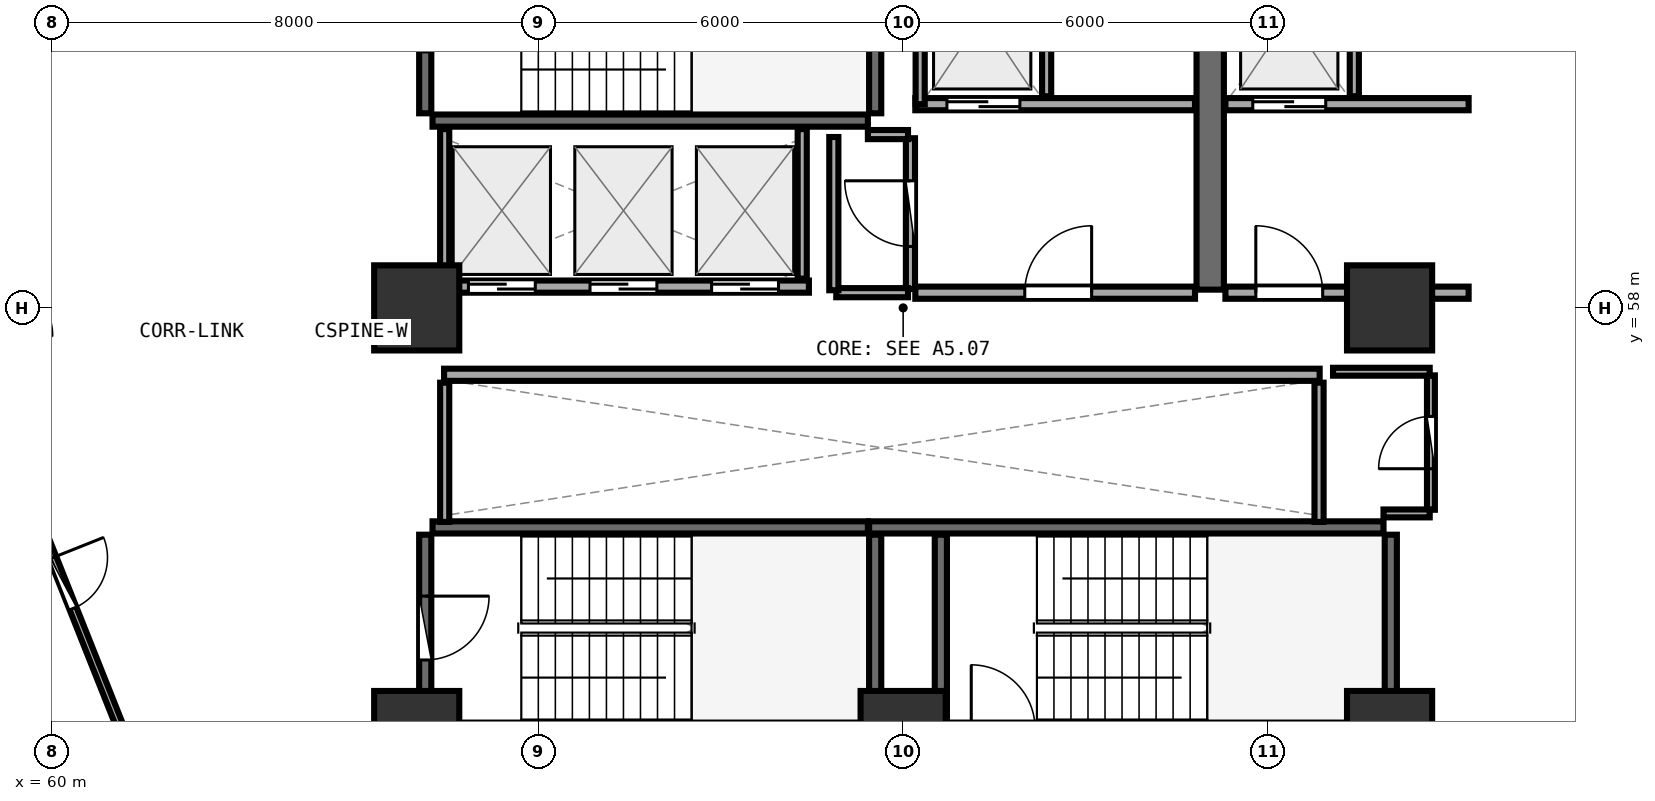
"""IFC4 building model, lengths in metres.
Left out: names, types, materials, properties, quantities, classifications, styles, units other than length and angle.
Written with IfcOpenShell. Run it as: python <this file> out.ifc"""

import sys

from ifc_helpers import new_model, si_unit, direction, frame, frame_2d, origin, origin_2d, place, context, subcontext, project, spatial, rectangle, extrude, element, fill, save


model = new_model("IFC4")
c1 = context("Model", 3, precision=1e-05, world=origin(), true_north=direction((0.0, 1.0)))
c2 = subcontext(c1, "Body", "Model", "MODEL_VIEW")
j1 = project(units=[si_unit("LENGTHUNIT", "METRE"), si_unit("PLANEANGLEUNIT", "RADIAN")], contexts=[c1])
p1 = place(None, origin())
s1 = spatial("IfcSite", under=j1, at=p1, CompositionType="ELEMENT")
p2 = place(p1, origin())
s2 = spatial("IfcBuilding", under=s1, at=p2, CompositionType="ELEMENT")
p3 = place(p2, frame((0.0, 0.0, 48.75)))
s3 = spatial("IfcBuildingStorey", under=s2, at=p3, CompositionType="ELEMENT", Elevation=48.75)
for number, where, z_axis, x_axis in (
    (1, (66.0, 51.0, 0.0), (0.0, 0.0, 1.0), (1.0, 0.0, 0.0)),
    (2, (74.0, 51.0, 0.0), (0.0, 0.0, 1.0), (1.0, 0.0, 0.0)),
    (3, (82.0, 51.0, 0.0), (0.0, 0.0, 1.0), (1.0, 0.0, 0.0)),
    (4, (82.0, 58.0, 0.0), (0.0, 0.0, 1.0), (1.0, 0.0, 0.0)),
    (5, (66.0, 58.0, 0.0), (0.0, 0.0, 1.0), (1.0, 0.0, 0.0)),
):
    element("IfcColumn", number, at=place(p3, frame(where, z_axis=z_axis, x_axis=x_axis)), inside=s3, PredefinedType="PILASTER", context=c2, shape_type="SweptSolid", body=[
        extrude(rectangle(XDim=1.4, YDim=1.4, at=origin_2d()), origin(), (0.0, 0.0, 1.0), 3.75),
    ])
p4 = place(p3, frame((66.26, 61.08, 0.0), z_axis=(0.0, 0.0, 1.0), x_axis=(1.0, 0.0, 0.0)))
e6 = element("IfcWall", 6, at=p4, inside=s3, PredefinedType="SHEAR", context=c2, shape_type="SweptSolid", body=[
    extrude(rectangle(XDim=7.16, YDim=0.2, at=frame_2d((3.58, 0.0))), origin(), (0.0, 0.0, 1.0), 3.49),
])
p5 = place(p3, frame((73.54, 61.2, 0.0), z_axis=(0.0, 0.0, 1.0), x_axis=(0.0, 1.0, 0.0)))
e7 = element("IfcWall", 7, at=p5, inside=s3, PredefinedType="SHEAR", context=c2, shape_type="SweptSolid", body=[
    extrude(rectangle(XDim=3.07, YDim=0.2, at=frame_2d((1.535, 0.0))), origin(), (0.0, 0.0, 1.0), 3.49),
])
p6 = place(p3, frame((66.14, 64.27, 0.0), z_axis=(0.0, 0.0, 1.0), x_axis=(0.0, -1.0, 0.0)))
e8 = element("IfcWall", 8, at=p6, inside=s3, PredefinedType="SHEAR", context=c2, shape_type="SweptSolid", body=[
    extrude(rectangle(XDim=3.07, YDim=0.2, at=frame_2d((1.535, 0.0))), origin(), (0.0, 0.0, 1.0), 3.49),
])
p7 = place(p6, frame((1.01, 0.0, 0.0)))
e9 = element("IfcOpeningElement", 9, at=p7, cuts=e8, PredefinedType="OPENING", context=c2, shape_type="SweptSolid", body=[
    extrude(rectangle(XDim=1.05, YDim=2.1, at=frame_2d((0.525, 1.05))), frame((0.0, 0.11, 0.0), z_axis=(0.0, -1.0, 0.0), x_axis=(1.0, 0.0, 0.0)), (0.0, 0.0, 1.0), 0.22),
])
p8 = place(p3, frame((82.02, 51.2, 0.0), z_axis=(0.0, 0.0, 1.0), x_axis=(0.0, 1.0, 0.0)))
e10 = element("IfcWall", 10, at=p8, inside=s3, PredefinedType="SHEAR", context=c2, shape_type="SweptSolid", body=[
    extrude(rectangle(XDim=3.07, YDim=0.2, at=frame_2d((1.535, 0.0))), origin(), (0.0, 0.0, 1.0), 3.49),
])
p9 = place(p3, frame((81.9, 54.39, 0.0), z_axis=(0.0, 0.0, 1.0), x_axis=(-1.0, 0.0, 0.0)))
e11 = element("IfcWall", 11, at=p9, inside=s3, PredefinedType="SHEAR", context=c2, shape_type="SweptSolid", body=[
    extrude(rectangle(XDim=8.46, YDim=0.2, at=frame_2d((4.23, 0.0))), origin(), (0.0, 0.0, 1.0), 3.49),
])
for number, where, z_axis, x_axis in (
    (12, (74.62, 54.27, 0.0), (0.0, 0.0, 1.0), (0.0, -1.0, 0.0)),
    (13, (73.54, 51.2, 0.0), (0.0, 0.0, 1.0), (0.0, 1.0, 0.0)),
):
    element("IfcWall", number, at=place(p3, frame(where, z_axis=z_axis, x_axis=x_axis)), inside=s3, PredefinedType="SHEAR", context=c2, shape_type="SweptSolid", body=[
        extrude(rectangle(XDim=3.07, YDim=0.2, at=frame_2d((1.535, 0.0))), origin(), (0.0, 0.0, 1.0), 3.49),
    ])
p10 = place(p3, frame((73.42, 54.39, 0.0), z_axis=(0.0, 0.0, 1.0), x_axis=(-1.0, 0.0, 0.0)))
e14 = element("IfcWall", 14, at=p10, inside=s3, PredefinedType="SHEAR", context=c2, shape_type="SweptSolid", body=[
    extrude(rectangle(XDim=7.16, YDim=0.2, at=frame_2d((3.58, 0.0))), origin(), (0.0, 0.0, 1.0), 3.49),
])
p11 = place(p3, frame((66.14, 54.27, 0.0), z_axis=(0.0, 0.0, 1.0), x_axis=(0.0, -1.0, 0.0)))
e15 = element("IfcWall", 15, at=p11, inside=s3, PredefinedType="SHEAR", context=c2, shape_type="SweptSolid", body=[
    extrude(rectangle(XDim=3.07, YDim=0.2, at=frame_2d((1.535, 0.0))), origin(), (0.0, 0.0, 1.0), 3.49),
])
p12 = place(p11, frame((1.01, 0.0, 0.0)))
e16 = element("IfcOpeningElement", 16, at=p12, cuts=e15, PredefinedType="OPENING", context=c2, shape_type="SweptSolid", body=[
    extrude(rectangle(XDim=1.05, YDim=2.1, at=frame_2d((0.525, 1.05))), frame((0.0, 0.11, 0.0), z_axis=(0.0, -1.0, 0.0), x_axis=(1.0, 0.0, 0.0)), (0.0, 0.0, 1.0), 0.22),
])
p13 = place(p3, frame((79.05, 58.3, 0.0), z_axis=(0.0, 0.0, 1.0), x_axis=(0.0, 1.0, 0.0)))
e17 = element("IfcWall", 17, at=p13, inside=s3, PredefinedType="SHEAR", context=c2, shape_type="SweptSolid", body=[
    extrude(rectangle(XDim=6.3, YDim=0.45, at=frame_2d((3.15, 0.0))), origin(), (0.0, 0.0, 1.0), 3.49),
])
p14 = place(p3, frame((74.2, 61.35, 0.0), z_axis=(0.0, 0.0, 1.0), x_axis=(1.0, 0.0, 0.0)))
e18 = element("IfcWall", 18, at=p14, inside=s3, PredefinedType="SOLIDWALL", context=c2, shape_type="SweptSolid", body=[
    extrude(rectangle(XDim=4.6, YDim=0.2, at=frame_2d((2.3, 0.0))), origin(), (0.0, 0.0, 1.0), 3.48),
])
p15 = place(p14, frame((0.52, 0.0, 0.0)))
e19 = element("IfcOpeningElement", 19, at=p15, cuts=e18, PredefinedType="OPENING", context=c2, shape_type="SweptSolid", body=[
    extrude(rectangle(XDim=1.2, YDim=2.15, at=frame_2d((0.6, 1.075))), frame((0.0, 0.11, 0.0), z_axis=(0.0, -1.0, 0.0), x_axis=(1.0, 0.0, 0.0)), (0.0, 0.0, 1.0), 0.22),
])
p16 = place(p3, frame((74.28, 61.35, 0.0), z_axis=(0.0, 0.0, 1.0), x_axis=(0.0, 1.0, 0.0)))
e20 = element("IfcWall", 20, at=p16, inside=s3, PredefinedType="PARTITIONING", context=c2, shape_type="SweptSolid", body=[
    extrude(rectangle(XDim=2.97, YDim=0.15, at=frame_2d((1.485, 0.0))), origin(), (0.0, 0.0, 1.0), 3.48),
])
p17 = place(p3, frame((76.36, 61.48, 0.0), z_axis=(0.0, 0.0, 1.0), x_axis=(0.0, 1.0, 0.0)))
e21 = element("IfcWall", 21, at=p17, inside=s3, PredefinedType="PARTITIONING", context=c2, shape_type="SweptSolid", body=[
    extrude(rectangle(XDim=2.84, YDim=0.15, at=frame_2d((1.42, 0.0))), origin(), (0.0, 0.0, 1.0), 3.48),
])
p18 = place(p3, frame((79.3, 61.35, 0.0), z_axis=(0.0, 0.0, 1.0), x_axis=(1.0, 0.0, 0.0)))
e22 = element("IfcWall", 22, at=p18, inside=s3, PredefinedType="SOLIDWALL", context=c2, shape_type="SweptSolid", body=[
    extrude(rectangle(XDim=4.0, YDim=0.2, at=frame_2d((2.0, 0.0))), origin(), (0.0, 0.0, 1.0), 2.775),
])
p19 = place(p18, frame((0.45, 0.0, 0.0)))
e23 = element("IfcOpeningElement", 23, at=p19, cuts=e22, PredefinedType="OPENING", context=c2, shape_type="SweptSolid", body=[
    extrude(rectangle(XDim=1.2, YDim=2.15, at=frame_2d((0.6, 1.075))), frame((0.0, 0.11, 0.0), z_axis=(0.0, -1.0, 0.0), x_axis=(1.0, 0.0, 0.0)), (0.0, 0.0, 1.0), 0.22),
])
p20 = place(p3, frame((81.42, 61.48, 0.0), z_axis=(0.0, 0.0, 1.0), x_axis=(0.0, 1.0, 0.0)))
e24 = element("IfcWall", 24, at=p20, inside=s3, PredefinedType="PARTITIONING", context=c2, shape_type="SweptSolid", body=[
    extrude(rectangle(XDim=2.84, YDim=0.15, at=frame_2d((1.42, 0.0))), origin(), (0.0, 0.0, 1.0), 3.48),
])
p21 = place(p3, frame((74.2, 58.25, 0.0), z_axis=(0.0, 0.0, 1.0), x_axis=(1.0, 0.0, 0.0)))
e25 = element("IfcWall", 25, at=p21, inside=s3, PredefinedType="SOLIDWALL", context=c2, shape_type="SweptSolid", body=[
    extrude(rectangle(XDim=4.6, YDim=0.2, at=frame_2d((2.3, 0.0))), origin(), (0.0, 0.0, 1.0), 3.48),
])
p22 = place(p21, frame((1.8, 0.0, 0.0)))
e26 = element("IfcOpeningElement", 26, at=p22, cuts=e25, PredefinedType="OPENING", context=c2, shape_type="SweptSolid", body=[
    extrude(rectangle(XDim=1.1, YDim=2.1, at=frame_2d((0.55, 1.05))), frame((0.0, 0.11, 0.0), z_axis=(0.0, -1.0, 0.0), x_axis=(1.0, 0.0, 0.0)), (0.0, 0.0, 1.0), 0.22),
])
p23 = place(p3, frame((79.3, 58.25, 0.0), z_axis=(0.0, 0.0, 1.0), x_axis=(1.0, 0.0, 0.0)))
e27 = element("IfcWall", 27, at=p23, inside=s3, PredefinedType="SOLIDWALL", context=c2, shape_type="SweptSolid", body=[
    extrude(rectangle(XDim=4.0, YDim=0.2, at=frame_2d((2.0, 0.0))), origin(), (0.0, 0.0, 1.0), 2.775),
])
p24 = place(p23, frame((0.5, 0.0, 0.0)))
e28 = element("IfcOpeningElement", 28, at=p24, cuts=e27, PredefinedType="OPENING", context=c2, shape_type="SweptSolid", body=[
    extrude(rectangle(XDim=1.1, YDim=2.1, at=frame_2d((0.55, 1.05))), frame((0.0, 0.11, 0.0), z_axis=(0.0, -1.0, 0.0), x_axis=(1.0, 0.0, 0.0)), (0.0, 0.0, 1.0), 0.22),
])
p25 = place(p3, frame((66.45, 58.35, 0.0), z_axis=(0.0, 0.0, 1.0), x_axis=(1.0, 0.0, 0.0)))
e29 = element("IfcWall", 29, at=p25, inside=s3, PredefinedType="SOLIDWALL", context=c2, shape_type="SweptSolid", body=[
    extrude(rectangle(XDim=6.0, YDim=0.2, at=frame_2d((3.0, 0.0))), origin(), (0.0, 0.0, 1.0), 3.48),
])
p26 = place(p25, frame((0.4, 0.0, 0.0)))
e30 = element("IfcOpeningElement", 30, at=p26, cuts=e29, PredefinedType="OPENING", context=c2, shape_type="SweptSolid", body=[
    extrude(rectangle(XDim=1.1, YDim=2.1, at=frame_2d((0.55, 1.05))), frame((0.0, 0.11, 0.0), z_axis=(0.0, -1.0, 0.0), x_axis=(1.0, 0.0, 0.0)), (0.0, 0.0, 1.0), 0.22),
])
p27 = place(p25, frame((2.4, 0.0, 0.0)))
e31 = element("IfcOpeningElement", 31, at=p27, cuts=e29, PredefinedType="OPENING", context=c2, shape_type="SweptSolid", body=[
    extrude(rectangle(XDim=1.1, YDim=2.1, at=frame_2d((0.55, 1.05))), frame((0.0, 0.11, 0.0), z_axis=(0.0, -1.0, 0.0), x_axis=(1.0, 0.0, 0.0)), (0.0, 0.0, 1.0), 0.22),
])
p28 = place(p25, frame((4.4, 0.0, 0.0)))
e32 = element("IfcOpeningElement", 32, at=p28, cuts=e29, PredefinedType="OPENING", context=c2, shape_type="SweptSolid", body=[
    extrude(rectangle(XDim=1.1, YDim=2.1, at=frame_2d((0.55, 1.05))), frame((0.0, 0.11, 0.0), z_axis=(0.0, -1.0, 0.0), x_axis=(1.0, 0.0, 0.0)), (0.0, 0.0, 1.0), 0.22),
])
for number, where, z_axis, x_axis in (
    (33, (66.46, 58.48, 0.0), (0.0, 0.0, 1.0), (0.0, 1.0, 0.0)),
    (34, (72.34, 58.48, 0.0), (0.0, 0.0, 1.0), (0.0, 1.0, 0.0)),
):
    element("IfcWall", number, at=place(p3, frame(where, z_axis=z_axis, x_axis=x_axis)), inside=s3, PredefinedType="PARTITIONING", context=c2, shape_type="SweptSolid", body=[
        extrude(rectangle(XDim=2.46, YDim=0.15, at=frame_2d((1.23, 0.0))), origin(), (0.0, 0.0, 1.0), 3.48),
    ])
p29 = place(p3, frame((66.45, 56.9, 0.0), z_axis=(0.0, 0.0, 1.0), x_axis=(1.0, 0.0, 0.0)))
e35 = element("IfcWall", 35, at=p29, inside=s3, PredefinedType="SOLIDWALL", context=c2, shape_type="SweptSolid", body=[
    extrude(rectangle(XDim=14.4, YDim=0.2, at=frame_2d((7.2, 0.0))), origin(), (0.0, 0.0, 1.0), 3.48),
])
for number, where, z_axis, x_axis in (
    (36, (66.46, 54.48, 0.0), (0.0, 0.0, 1.0), (0.0, 1.0, 0.0)),
    (37, (80.84, 54.48, 0.0), (0.0, 0.0, 1.0), (0.0, 1.0, 0.0)),
):
    element("IfcWall", number, at=place(p3, frame(where, z_axis=z_axis, x_axis=x_axis)), inside=s3, PredefinedType="PARTITIONING", context=c2, shape_type="SweptSolid", body=[
        extrude(rectangle(XDim=2.29, YDim=0.15, at=frame_2d((1.145, 0.0))), origin(), (0.0, 0.0, 1.0), 3.48),
    ])
p30 = place(p3, frame((74.12, 58.31, 0.0), z_axis=(0.0, 0.0, 1.0), x_axis=(0.0, 1.0, 0.0)))
e38 = element("IfcWall", 38, at=p30, inside=s3, PredefinedType="PARTITIONING", context=c2, shape_type="SweptSolid", body=[
    extrude(rectangle(XDim=2.48, YDim=0.15, at=frame_2d((1.24, 0.0))), origin(), (0.0, 0.0, 1.0), 3.48),
])
p31 = place(p30, frame((0.7, 0.0, 0.0)))
e39 = element("IfcOpeningElement", 39, at=p31, cuts=e38, PredefinedType="OPENING", context=c2, shape_type="SweptSolid", body=[
    extrude(rectangle(XDim=1.08, YDim=2.1, at=frame_2d((0.54, 1.05))), frame((0.0, 0.085, 0.0), z_axis=(0.0, -1.0, 0.0), x_axis=(1.0, 0.0, 0.0)), (0.0, 0.0, 1.0), 0.17),
])
p32 = place(p3, frame((82.68, 54.68, 0.0), z_axis=(0.0, 0.0, 1.0), x_axis=(0.0, 1.0, 0.0)))
e40 = element("IfcWall", 40, at=p32, inside=s3, PredefinedType="PLUMBINGWALL", context=c2, shape_type="SweptSolid", body=[
    extrude(rectangle(XDim=2.21, YDim=0.13, at=frame_2d((1.105, 0.0))), origin(), (0.0, 0.0, 1.0), 3.48),
])
p33 = place(p32, frame((0.675, 0.0, 0.0)))
e41 = element("IfcOpeningElement", 41, at=p33, cuts=e40, PredefinedType="OPENING", context=c2, shape_type="SweptSolid", body=[
    extrude(rectangle(XDim=0.86, YDim=2.05, at=frame_2d((0.43, 1.025))), frame((0.0, 0.075, 0.0), z_axis=(0.0, -1.0, 0.0), x_axis=(1.0, 0.0, 0.0)), (0.0, 0.0, 1.0), 0.15),
])
p34 = place(p3, frame((59.128, 56.118, 0.0), z_axis=(0.0, 0.0, 1.0), x_axis=(0.369903929858, -0.929070009566, 0.0)))
e42 = element("IfcWall", 42, at=p34, inside=s3, PredefinedType="PARTITIONING", context=c2, shape_type="SweptSolid", body=[
    extrude(rectangle(XDim=5.693, YDim=0.12, at=frame_2d((2.846, 0.0))), origin(), (0.0, 0.0, 1.0), 2.875),
])
p35 = place(p34, frame((2.396, 0.0, 0.0)))
e43 = element("IfcOpeningElement", 43, at=p35, cuts=e42, PredefinedType="OPENING", context=c2, shape_type="SweptSolid", body=[
    extrude(rectangle(XDim=0.9, YDim=2.08, at=frame_2d((0.45, 1.04))), frame((0.0, 0.07, 0.0), z_axis=(0.0, -1.0, 0.0), x_axis=(1.0, 0.0, 0.0)), (0.0, 0.0, 1.0), 0.14),
])
p36 = place(p3, frame((84.895, 48.628, 0.0), z_axis=(0.0, 0.0, 1.0), x_axis=(0.560933949984, 0.827860558159, 0.0)))
e44 = element("IfcWall", 44, at=p36, inside=s3, PredefinedType="PARTITIONING", context=c2, shape_type="SweptSolid", body=[
    extrude(rectangle(XDim=5.788, YDim=0.12, at=frame_2d((2.894, 0.0))), origin(), (0.0, 0.0, 1.0), 2.875),
])
p37 = place(p36, frame((2.444, 0.0, 0.0)))
e45 = element("IfcOpeningElement", 45, at=p37, cuts=e44, PredefinedType="OPENING", context=c2, shape_type="SweptSolid", body=[
    extrude(rectangle(XDim=0.9, YDim=2.08, at=frame_2d((0.45, 1.04))), frame((0.0, 0.07, 0.0), z_axis=(0.0, -1.0, 0.0), x_axis=(1.0, 0.0, 0.0)), (0.0, 0.0, 1.0), 0.14),
])
p38 = place(p3, frame((72.9, 58.25, 0.0), z_axis=(0.0, 0.0, 1.0), x_axis=(1.0, 0.0, 0.0)))
e46 = element("IfcWall", 46, at=p38, inside=s3, PredefinedType="PARTITIONING", context=c2, shape_type="SweptSolid", body=[
    extrude(rectangle(XDim=1.18, YDim=0.15, at=frame_2d((0.59, 0.0))), origin(), (0.0, 0.0, 1.0), 3.48),
])
p39 = place(p3, frame((74.08, 60.85, 0.0), z_axis=(0.0, 0.0, 1.0), x_axis=(-1.0, 0.0, 0.0)))
e47 = element("IfcWall", 47, at=p39, inside=s3, PredefinedType="PARTITIONING", context=c2, shape_type="SweptSolid", body=[
    extrude(rectangle(XDim=0.66, YDim=0.15, at=frame_2d((0.33, 0.0))), origin(), (0.0, 0.0, 1.0), 3.48),
])
p40 = place(p3, frame((72.86, 60.81, 0.0), z_axis=(0.0, 0.0, 1.0), x_axis=(0.0, -1.0, 0.0)))
e48 = element("IfcWall", 48, at=p40, inside=s3, PredefinedType="PARTITIONING", context=c2, shape_type="SweptSolid", body=[
    extrude(rectangle(XDim=2.52, YDim=0.15, at=frame_2d((1.26, 0.0))), origin(), (0.0, 0.0, 1.0), 3.48),
])
p41 = place(p3, frame((81.9, 54.62, 0.0), z_axis=(0.0, 0.0, 1.0), x_axis=(1.0, 0.0, 0.0)))
e49 = element("IfcWall", 49, at=p41, inside=s3, PredefinedType="PLUMBINGWALL", context=c2, shape_type="SweptSolid", body=[
    extrude(rectangle(XDim=0.76, YDim=0.13, at=frame_2d((0.38, 0.0))), origin(), (0.0, 0.0, 1.0), 2.775),
])
p42 = place(p3, frame((82.66, 56.95, 0.0), z_axis=(0.0, 0.0, 1.0), x_axis=(-1.0, 0.0, 0.0)))
e50 = element("IfcWall", 50, at=p42, inside=s3, PredefinedType="PLUMBINGWALL", context=c2, shape_type="SweptSolid", body=[
    extrude(rectangle(XDim=1.59, YDim=0.13, at=frame_2d((0.795, 0.0))), origin(), (0.0, 0.0, 1.0), 2.775),
])
p43 = place(p12, origin())
e51 = element("IfcDoor", 51, at=p43, inside=s3, OperationType="SINGLE_SWING_LEFT", PredefinedType="DOOR", context=c2, shape_type="SweptSolid", body=[
    extrude(rectangle(XDim=1.05, YDim=2.1, at=frame_2d((0.525, 1.05))), frame((0.0, 0.025, 0.0), z_axis=(0.0, -1.0, 0.0), x_axis=(1.0, 0.0, 0.0)), (0.0, 0.0, 1.0), 0.05),
])
fill(e16, e51)
p44 = place(p15, origin())
e52 = element("IfcDoor", 52, at=p44, inside=s3, OperationType="DOUBLE_DOOR_SLIDING", PredefinedType="DOOR", context=c2, shape_type="SweptSolid", body=[
    extrude(rectangle(XDim=1.2, YDim=2.15, at=frame_2d((0.6, 1.075))), frame((0.0, 0.025, 0.0), z_axis=(0.0, -1.0, 0.0), x_axis=(1.0, 0.0, 0.0)), (0.0, 0.0, 1.0), 0.05),
])
fill(e19, e52)
p45 = place(p19, origin())
e53 = element("IfcDoor", 53, at=p45, inside=s3, OperationType="DOUBLE_DOOR_SLIDING", PredefinedType="DOOR", context=c2, shape_type="SweptSolid", body=[
    extrude(rectangle(XDim=1.2, YDim=2.15, at=frame_2d((0.6, 1.075))), frame((0.0, 0.025, 0.0), z_axis=(0.0, -1.0, 0.0), x_axis=(1.0, 0.0, 0.0)), (0.0, 0.0, 1.0), 0.05),
])
fill(e23, e53)
p46 = place(p22, frame((1.1, 0.0, 0.0), z_axis=(0.0, 0.0, 1.0), x_axis=(-1.0, 0.0, 0.0)))
e54 = element("IfcDoor", 54, at=p46, inside=s3, OperationType="SINGLE_SWING_LEFT", PredefinedType="DOOR", context=c2, shape_type="SweptSolid", body=[
    extrude(rectangle(XDim=1.1, YDim=2.1, at=frame_2d((0.55, 1.05))), frame((0.0, 0.025, 0.0), z_axis=(0.0, -1.0, 0.0), x_axis=(1.0, 0.0, 0.0)), (0.0, 0.0, 1.0), 0.05),
])
fill(e26, e54)
p47 = place(p24, frame((1.1, 0.0, 0.0), z_axis=(0.0, 0.0, 1.0), x_axis=(-1.0, 0.0, 0.0)))
e55 = element("IfcDoor", 55, at=p47, inside=s3, OperationType="SINGLE_SWING_RIGHT", PredefinedType="DOOR", context=c2, shape_type="SweptSolid", body=[
    extrude(rectangle(XDim=1.1, YDim=2.1, at=frame_2d((0.55, 1.05))), frame((0.0, 0.025, 0.0), z_axis=(0.0, -1.0, 0.0), x_axis=(1.0, 0.0, 0.0)), (0.0, 0.0, 1.0), 0.05),
])
fill(e28, e55)
p48 = place(p26, origin())
e56 = element("IfcDoor", 56, at=p48, inside=s3, OperationType="DOUBLE_DOOR_SLIDING", PredefinedType="DOOR", context=c2, shape_type="SweptSolid", body=[
    extrude(rectangle(XDim=1.1, YDim=2.1, at=frame_2d((0.55, 1.05))), frame((0.0, 0.025, 0.0), z_axis=(0.0, -1.0, 0.0), x_axis=(1.0, 0.0, 0.0)), (0.0, 0.0, 1.0), 0.05),
])
fill(e30, e56)
p49 = place(p27, origin())
e57 = element("IfcDoor", 57, at=p49, inside=s3, OperationType="DOUBLE_DOOR_SLIDING", PredefinedType="DOOR", context=c2, shape_type="SweptSolid", body=[
    extrude(rectangle(XDim=1.1, YDim=2.1, at=frame_2d((0.55, 1.05))), frame((0.0, 0.025, 0.0), z_axis=(0.0, -1.0, 0.0), x_axis=(1.0, 0.0, 0.0)), (0.0, 0.0, 1.0), 0.05),
])
fill(e31, e57)
p50 = place(p28, origin())
e58 = element("IfcDoor", 58, at=p50, inside=s3, OperationType="DOUBLE_DOOR_SLIDING", PredefinedType="DOOR", context=c2, shape_type="SweptSolid", body=[
    extrude(rectangle(XDim=1.1, YDim=2.1, at=frame_2d((0.55, 1.05))), frame((0.0, 0.025, 0.0), z_axis=(0.0, -1.0, 0.0), x_axis=(1.0, 0.0, 0.0)), (0.0, 0.0, 1.0), 0.05),
])
fill(e32, e58)
p51 = place(p31, origin())
e59 = element("IfcDoor", 59, at=p51, inside=s3, OperationType="SINGLE_SWING_RIGHT", PredefinedType="DOOR", context=c2, shape_type="SweptSolid", body=[
    extrude(rectangle(XDim=1.08, YDim=2.1, at=frame_2d((0.54, 1.05))), frame((0.0, 0.025, 0.0), z_axis=(0.0, -1.0, 0.0), x_axis=(1.0, 0.0, 0.0)), (0.0, 0.0, 1.0), 0.05),
])
fill(e39, e59)
p52 = place(p33, origin())
e60 = element("IfcDoor", 60, at=p52, inside=s3, OperationType="SINGLE_SWING_LEFT", PredefinedType="DOOR", context=c2, shape_type="SweptSolid", body=[
    extrude(rectangle(XDim=0.86, YDim=2.05, at=frame_2d((0.43, 1.025))), frame((0.0, 0.025, 0.0), z_axis=(0.0, -1.0, 0.0), x_axis=(1.0, 0.0, 0.0)), (0.0, 0.0, 1.0), 0.05),
])
fill(e41, e60)
p53 = place(p35, origin())
e61 = element("IfcDoor", 61, at=p53, inside=s3, OperationType="SINGLE_SWING_LEFT", PredefinedType="DOOR", context=c2, shape_type="SweptSolid", body=[
    extrude(rectangle(XDim=0.9, YDim=2.08, at=frame_2d((0.45, 1.04))), frame((0.0, 0.025, 0.0), z_axis=(0.0, -1.0, 0.0), x_axis=(1.0, 0.0, 0.0)), (0.0, 0.0, 1.0), 0.05),
])
fill(e43, e61)
save(model, sys.argv[1])
